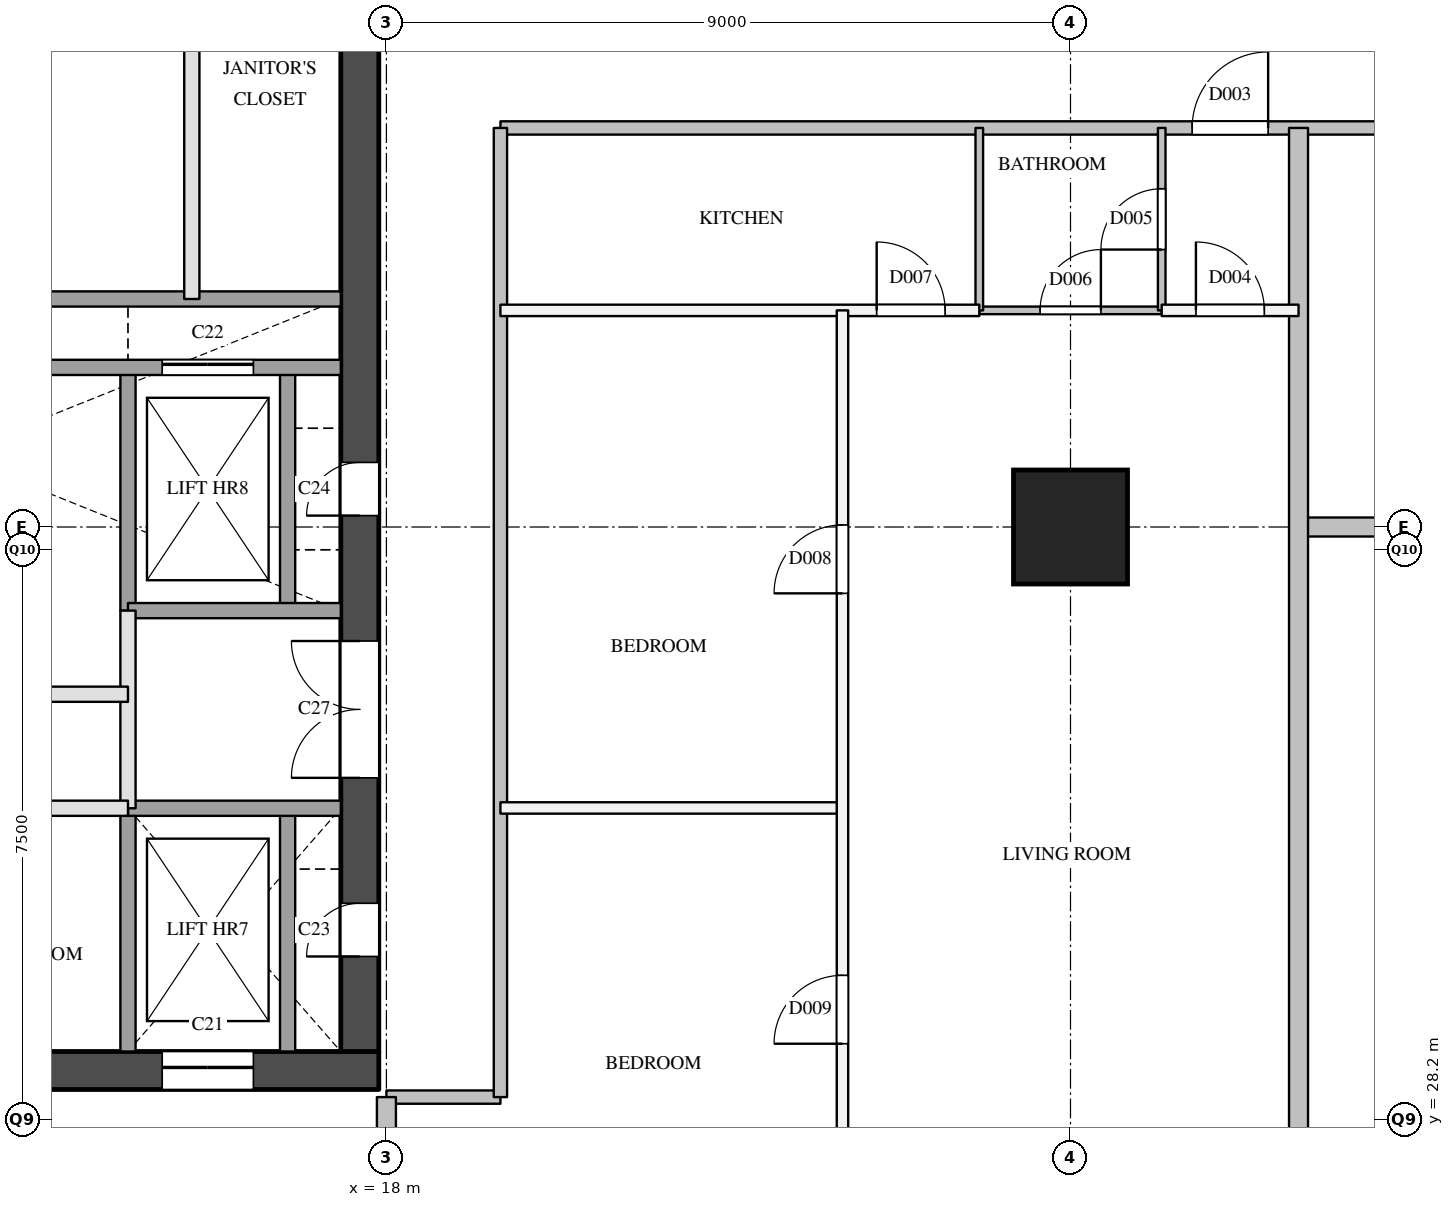
"""IFC4 building model, lengths in metres.
Left out: names, types, materials, properties, quantities, classifications, styles, units other than length and angle.
Written with IfcOpenShell. Run it as: python <this file> out.ifc"""

import sys

from ifc_helpers import new_model, si_unit, direction, frame, frame_2d, origin, origin_2d, place, context, subcontext, project, spatial, rectangle, extrude, element, fill, save


model = new_model("IFC4")
c1 = context("Model", 3, precision=1e-05, world=origin(), true_north=direction((0.0, 1.0)))
c2 = subcontext(c1, "Body", "Model", "MODEL_VIEW")
j1 = project(units=[si_unit("LENGTHUNIT", "METRE"), si_unit("PLANEANGLEUNIT", "RADIAN")], contexts=[c1])
p1 = place(None, origin())
s1 = spatial("IfcSite", under=j1, at=p1, CompositionType="ELEMENT")
p2 = place(p1, origin())
s2 = spatial("IfcBuilding", under=s1, at=p2, CompositionType="ELEMENT")
p3 = place(p2, frame((0.0, 0.0, 158.3)))
s3 = spatial("IfcBuildingStorey", under=s2, at=p3, CompositionType="ELEMENT", Elevation=158.3)
p4 = place(p3, frame((27.0, 36.0, 0.0), z_axis=(0.0, 0.0, 1.0), x_axis=(1.0, 0.0, 0.0)))
e1 = element("IfcColumn", 1, at=p4, inside=s3, PredefinedType="COLUMN", context=c2, shape_type="SweptSolid", body=[
    extrude(rectangle(XDim=1.5, YDim=1.5, at=origin_2d()), origin(), (0.0, 0.0, 1.0), 3.9),
])
p5 = place(p3, frame((5.7, 28.85, 0.0), z_axis=(0.0, 0.0, 1.0), x_axis=(1.0, 0.0, 0.0)))
e2 = element("IfcWall", 2, at=p5, inside=s3, PredefinedType="SHEAR", context=c2, shape_type="SweptSolid", body=[
    extrude(rectangle(XDim=12.2, YDim=0.5, at=frame_2d((6.1, 0.0))), origin(), (0.0, 0.0, 1.0), 3.6),
])
p6 = place(p5, frame((9.35, 0.0, 0.0)))
e3 = element("IfcOpeningElement", 3, at=p6, cuts=e2, PredefinedType="OPENING", context=c2, shape_type="SweptSolid", body=[
    extrude(rectangle(XDim=1.2, YDim=2.1, at=frame_2d((0.6, 1.05))), frame((0.0, 0.26, 0.0), z_axis=(0.0, -1.0, 0.0), x_axis=(1.0, 0.0, 0.0)), (0.0, 0.0, 1.0), 0.52),
])
p7 = place(p3, frame((17.65, 29.1, 0.0), z_axis=(0.0, 0.0, 1.0), x_axis=(0.0, 1.0, 0.0)))
e4 = element("IfcWall", 4, at=p7, inside=s3, PredefinedType="SHEAR", context=c2, shape_type="SweptSolid", body=[
    extrude(rectangle(XDim=20.3, YDim=0.5, at=frame_2d((10.15, 0.0))), origin(), (0.0, 0.0, 1.0), 3.6),
])
p8 = place(p7, frame((1.25, 0.0, 0.0)))
e5 = element("IfcOpeningElement", 5, at=p8, cuts=e4, PredefinedType="OPENING", context=c2, shape_type="SweptSolid", body=[
    extrude(rectangle(XDim=0.7, YDim=2.1, at=frame_2d((0.35, 1.05))), frame((0.0, 0.26, 0.0), z_axis=(0.0, -1.0, 0.0), x_axis=(1.0, 0.0, 0.0)), (0.0, 0.0, 1.0), 0.52),
])
p9 = place(p7, frame((7.05, 0.0, 0.0)))
e6 = element("IfcOpeningElement", 6, at=p9, cuts=e4, PredefinedType="OPENING", context=c2, shape_type="SweptSolid", body=[
    extrude(rectangle(XDim=0.7, YDim=2.1, at=frame_2d((0.35, 1.05))), frame((0.0, 0.26, 0.0), z_axis=(0.0, -1.0, 0.0), x_axis=(1.0, 0.0, 0.0)), (0.0, 0.0, 1.0), 0.52),
])
p10 = place(p7, frame((3.6, 0.0, 0.0)))
e7 = element("IfcOpeningElement", 7, at=p10, cuts=e4, PredefinedType="OPENING", context=c2, shape_type="SweptSolid", body=[
    extrude(rectangle(XDim=1.8, YDim=2.1, at=frame_2d((0.9, 1.05))), frame((0.0, 0.26, 0.0), z_axis=(0.0, -1.0, 0.0), x_axis=(1.0, 0.0, 0.0)), (0.0, 0.0, 1.0), 0.52),
])
p11 = place(p3, frame((14.6, 32.3, 0.0), z_axis=(0.0, 0.0, 1.0), x_axis=(0.0, 1.0, 0.0)))
e8 = element("IfcWall", 8, at=p11, inside=s3, PredefinedType="PARTITIONING", context=c2, shape_type="SweptSolid", body=[
    extrude(rectangle(XDim=2.6, YDim=0.2, at=frame_2d((1.3, 0.0))), origin(), (0.0, 0.0, 1.0), 3.6),
])
p12 = place(p3, frame((14.6, 29.1, 0.0), z_axis=(0.0, 0.0, 1.0), x_axis=(0.0, 1.0, 0.0)))
e9 = element("IfcWall", 9, at=p12, inside=s3, PredefinedType="SOLIDWALL", context=c2, shape_type="SweptSolid", body=[
    extrude(rectangle(XDim=3.2, YDim=0.2, at=frame_2d((1.6, 0.0))), origin(), (0.0, 0.0, 1.0), 3.6),
])
p13 = place(p3, frame((14.6, 34.9, 0.0), z_axis=(0.0, 0.0, 1.0), x_axis=(0.0, 1.0, 0.0)))
e10 = element("IfcWall", 10, at=p13, inside=s3, PredefinedType="SOLIDWALL", context=c2, shape_type="SweptSolid", body=[
    extrude(rectangle(XDim=3.2, YDim=0.2, at=frame_2d((1.6, 0.0))), origin(), (0.0, 0.0, 1.0), 3.6),
])
p14 = place(p3, frame((15.44, 39.0, 0.0), z_axis=(0.0, 0.0, 1.0), x_axis=(0.0, 1.0, 0.0)))
e11 = element("IfcWall", 11, at=p14, inside=s3, PredefinedType="PARTITIONING", context=c2, shape_type="SweptSolid", body=[
    extrude(rectangle(XDim=6.2, YDim=0.2, at=frame_2d((3.1, 0.0))), origin(), (0.0, 0.0, 1.0), 3.6),
])
p15 = place(p3, frame((16.7, 29.1, 0.0), z_axis=(0.0, 0.0, 1.0), x_axis=(0.0, 1.0, 0.0)))
e12 = element("IfcWall", 12, at=p15, inside=s3, PredefinedType="SOLIDWALL", context=c2, shape_type="SweptSolid", body=[
    extrude(rectangle(XDim=3.2, YDim=0.2, at=frame_2d((1.6, 0.0))), origin(), (0.0, 0.0, 1.0), 3.6),
])
p16 = place(p3, frame((16.7, 34.9, 0.0), z_axis=(0.0, 0.0, 1.0), x_axis=(0.0, 1.0, 0.0)))
e13 = element("IfcWall", 13, at=p16, inside=s3, PredefinedType="SOLIDWALL", context=c2, shape_type="SweptSolid", body=[
    extrude(rectangle(XDim=3.2, YDim=0.2, at=frame_2d((1.6, 0.0))), origin(), (0.0, 0.0, 1.0), 3.6),
])
p17 = place(p3, frame((6.2, 32.3, 0.0), z_axis=(0.0, 0.0, 1.0), x_axis=(1.0, 0.0, 0.0)))
e14 = element("IfcWall", 14, at=p17, inside=s3, PredefinedType="PARTITIONING", context=c2, shape_type="SweptSolid", body=[
    extrude(rectangle(XDim=8.4, YDim=0.2, at=frame_2d((4.2, 0.0))), origin(), (0.0, 0.0, 1.0), 3.6),
])
p18 = place(p17, frame((1.23, 0.0, 0.0)))
e15 = element("IfcOpeningElement", 15, at=p18, cuts=e14, PredefinedType="OPENING", context=c2, shape_type="SweptSolid", body=[
    extrude(rectangle(XDim=0.9, YDim=2.1, at=frame_2d((0.45, 1.05))), frame((0.0, 0.11, 0.0), z_axis=(0.0, -1.0, 0.0), x_axis=(1.0, 0.0, 0.0)), (0.0, 0.0, 1.0), 0.22),
])
p19 = place(p17, frame((3.96, 0.0, 0.0)))
e16 = element("IfcOpeningElement", 16, at=p19, cuts=e14, PredefinedType="OPENING", context=c2, shape_type="SweptSolid", body=[
    extrude(rectangle(XDim=0.9, YDim=2.1, at=frame_2d((0.45, 1.05))), frame((0.0, 0.11, 0.0), z_axis=(0.0, -1.0, 0.0), x_axis=(1.0, 0.0, 0.0)), (0.0, 0.0, 1.0), 0.22),
])
p20 = place(p17, frame((6.48, 0.0, 0.0)))
e17 = element("IfcOpeningElement", 17, at=p20, cuts=e14, PredefinedType="OPENING", context=c2, shape_type="SweptSolid", body=[
    extrude(rectangle(XDim=0.9, YDim=2.1, at=frame_2d((0.45, 1.05))), frame((0.0, 0.11, 0.0), z_axis=(0.0, -1.0, 0.0), x_axis=(1.0, 0.0, 0.0)), (0.0, 0.0, 1.0), 0.22),
])
p21 = place(p3, frame((14.6, 32.3, 0.0), z_axis=(0.0, 0.0, 1.0), x_axis=(1.0, 0.0, 0.0)))
e18 = element("IfcWall", 18, at=p21, inside=s3, PredefinedType="SOLIDWALL", context=c2, shape_type="SweptSolid", body=[
    extrude(rectangle(XDim=2.8, YDim=0.2, at=frame_2d((1.4, 0.0))), origin(), (0.0, 0.0, 1.0), 3.6),
])
p22 = place(p3, frame((6.2, 33.8, 0.0), z_axis=(0.0, 0.0, 1.0), x_axis=(1.0, 0.0, 0.0)))
e19 = element("IfcWall", 19, at=p22, inside=s3, PredefinedType="PARTITIONING", context=c2, shape_type="SweptSolid", body=[
    extrude(rectangle(XDim=8.4, YDim=0.2, at=frame_2d((4.2, 0.0))), origin(), (0.0, 0.0, 1.0), 3.6),
])
p23 = place(p22, frame((3.75, 0.0, 0.0)))
e20 = element("IfcOpeningElement", 20, at=p23, cuts=e19, PredefinedType="OPENING", context=c2, shape_type="SweptSolid", body=[
    extrude(rectangle(XDim=0.9, YDim=2.1, at=frame_2d((0.45, 1.05))), frame((0.0, 0.11, 0.0), z_axis=(0.0, -1.0, 0.0), x_axis=(1.0, 0.0, 0.0)), (0.0, 0.0, 1.0), 0.22),
])
p24 = place(p3, frame((14.6, 34.9, 0.0), z_axis=(0.0, 0.0, 1.0), x_axis=(1.0, 0.0, 0.0)))
e21 = element("IfcWall", 21, at=p24, inside=s3, PredefinedType="SOLIDWALL", context=c2, shape_type="SweptSolid", body=[
    extrude(rectangle(XDim=2.8, YDim=0.2, at=frame_2d((1.4, 0.0))), origin(), (0.0, 0.0, 1.0), 3.6),
])
p25 = place(p3, frame((6.2, 38.1, 0.0), z_axis=(0.0, 0.0, 1.0), x_axis=(1.0, 0.0, 0.0)))
e22 = element("IfcWall", 22, at=p25, inside=s3, PredefinedType="SOLIDWALL", context=c2, shape_type="SweptSolid", body=[
    extrude(rectangle(XDim=11.2, YDim=0.2, at=frame_2d((5.6, 0.0))), origin(), (0.0, 0.0, 1.0), 3.6),
])
p26 = place(p25, frame((8.85, 0.0, 0.0)))
e23 = element("IfcOpeningElement", 23, at=p26, cuts=e22, PredefinedType="OPENING", context=c2, shape_type="SweptSolid", body=[
    extrude(rectangle(XDim=1.2, YDim=2.1, at=frame_2d((0.6, 1.05))), frame((0.0, 0.11, 0.0), z_axis=(0.0, -1.0, 0.0), x_axis=(1.0, 0.0, 0.0)), (0.0, 0.0, 1.0), 0.22),
])
p27 = place(p3, frame((12.5, 39.0, 0.0), z_axis=(0.0, 0.0, 1.0), x_axis=(1.0, 0.0, 0.0)))
e24 = element("IfcWall", 24, at=p27, inside=s3, PredefinedType="SOLIDWALL", context=c2, shape_type="SweptSolid", body=[
    extrude(rectangle(XDim=4.9, YDim=0.2, at=frame_2d((2.45, 0.0))), origin(), (0.0, 0.0, 1.0), 3.6),
])
p28 = place(p3, frame((18.0, 28.5, 0.0), z_axis=(0.0, 0.0, 1.0), x_axis=(1.0, 0.0, 0.0)))
e25 = element("IfcWall", 25, at=p28, inside=s3, PredefinedType="PARTITIONING", context=c2, shape_type="SweptSolid", body=[
    extrude(rectangle(XDim=1.5, YDim=0.175, at=frame_2d((0.75, 0.0))), origin(), (0.0, 0.0, 1.0), 3.6),
])
p29 = place(p3, frame((19.5, 41.25, 0.0), z_axis=(0.0, 0.0, 1.0), x_axis=(1.0, 0.0, 0.0)))
e26 = element("IfcWall", 26, at=p29, inside=s3, PredefinedType="PARTITIONING", context=c2, shape_type="SweptSolid", body=[
    extrude(rectangle(XDim=15.0, YDim=0.175, at=frame_2d((7.5, 0.0))), origin(), (0.0, 0.0, 1.0), 2.6),
])
p30 = place(p29, frame((9.1, 0.0, 0.0)))
e27 = element("IfcOpeningElement", 27, at=p30, cuts=e26, PredefinedType="OPENING", context=c2, shape_type="SweptSolid", body=[
    extrude(rectangle(XDim=1.0, YDim=2.1, at=frame_2d((0.5, 1.05))), frame((0.0, 0.097, 0.0), z_axis=(0.0, -1.0, 0.0), x_axis=(1.0, 0.0, 0.0)), (0.0, 0.0, 1.0), 0.195),
])
p31 = place(p3, frame((19.5, 28.5, 0.0), z_axis=(0.0, 0.0, 1.0), x_axis=(0.0, 1.0, 0.0)))
e28 = element("IfcWall", 28, at=p31, inside=s3, PredefinedType="PARTITIONING", context=c2, shape_type="SweptSolid", body=[
    extrude(rectangle(XDim=12.75, YDim=0.175, at=frame_2d((6.375, 0.0))), origin(), (0.0, 0.0, 1.0), 3.6),
])
p32 = place(p3, frame((19.5, 32.304, 0.0), z_axis=(0.0, 0.0, 1.0), x_axis=(1.0, 0.0, 0.0)))
e29 = element("IfcWall", 29, at=p32, inside=s3, PredefinedType="PARTITIONING", context=c2, shape_type="SweptSolid", body=[
    extrude(rectangle(XDim=4.5, YDim=0.15, at=frame_2d((2.25, 0.0))), origin(), (0.0, 0.0, 1.0), 3.6),
])
p33 = place(p3, frame((19.5, 38.85, 0.0), z_axis=(0.0, 0.0, 1.0), x_axis=(1.0, 0.0, 0.0)))
e30 = element("IfcWall", 30, at=p33, inside=s3, PredefinedType="PARTITIONING", context=c2, shape_type="SweptSolid", body=[
    extrude(rectangle(XDim=6.3, YDim=0.15, at=frame_2d((3.15, 0.0))), origin(), (0.0, 0.0, 1.0), 3.6),
])
p34 = place(p33, frame((4.95, 0.0, 0.0)))
e31 = element("IfcOpeningElement", 31, at=p34, cuts=e30, PredefinedType="OPENING", context=c2, shape_type="SweptSolid", body=[
    extrude(rectangle(XDim=0.9, YDim=2.1, at=frame_2d((0.45, 1.05))), frame((0.0, 0.085, 0.0), z_axis=(0.0, -1.0, 0.0), x_axis=(1.0, 0.0, 0.0)), (0.0, 0.0, 1.0), 0.17),
])
p35 = place(p3, frame((28.2, 38.85, 0.0), z_axis=(0.0, 0.0, 1.0), x_axis=(1.0, 0.0, 0.0)))
e32 = element("IfcWall", 32, at=p35, inside=s3, PredefinedType="PARTITIONING", context=c2, shape_type="SweptSolid", body=[
    extrude(rectangle(XDim=1.8, YDim=0.15, at=frame_2d((0.9, 0.0))), origin(), (0.0, 0.0, 1.0), 3.6),
])
p36 = place(p35, frame((0.45, 0.0, 0.0)))
e33 = element("IfcOpeningElement", 33, at=p36, cuts=e32, PredefinedType="OPENING", context=c2, shape_type="SweptSolid", body=[
    extrude(rectangle(XDim=0.9, YDim=2.1, at=frame_2d((0.45, 1.05))), frame((0.0, 0.085, 0.0), z_axis=(0.0, -1.0, 0.0), x_axis=(1.0, 0.0, 0.0)), (0.0, 0.0, 1.0), 0.17),
])
p37 = place(p3, frame((24.0, 27.0, 0.0), z_axis=(0.0, 0.0, 1.0), x_axis=(0.0, 1.0, 0.0)))
e34 = element("IfcWall", 34, at=p37, inside=s3, PredefinedType="PARTITIONING", context=c2, shape_type="SweptSolid", body=[
    extrude(rectangle(XDim=11.85, YDim=0.15, at=frame_2d((5.925, 0.0))), origin(), (0.0, 0.0, 1.0), 2.6),
])
p38 = place(p37, frame((8.127, 0.0, 0.0)))
e35 = element("IfcOpeningElement", 35, at=p38, cuts=e34, PredefinedType="OPENING", context=c2, shape_type="SweptSolid", body=[
    extrude(rectangle(XDim=0.9, YDim=2.1, at=frame_2d((0.45, 1.05))), frame((0.0, 0.085, 0.0), z_axis=(0.0, -1.0, 0.0), x_axis=(1.0, 0.0, 0.0)), (0.0, 0.0, 1.0), 0.17),
])
p39 = place(p37, frame((2.202, 0.0, 0.0)))
e36 = element("IfcOpeningElement", 36, at=p39, cuts=e34, PredefinedType="OPENING", context=c2, shape_type="SweptSolid", body=[
    extrude(rectangle(XDim=0.9, YDim=2.1, at=frame_2d((0.45, 1.05))), frame((0.0, 0.085, 0.0), z_axis=(0.0, -1.0, 0.0), x_axis=(1.0, 0.0, 0.0)), (0.0, 0.0, 1.0), 0.17),
])
p40 = place(p3, frame((30.0, 36.0, 0.0), z_axis=(0.0, 0.0, 1.0), x_axis=(1.0, 0.0, 0.0)))
e37 = element("IfcWall", 37, at=p40, inside=s3, PredefinedType="PARTITIONING", context=c2, shape_type="SweptSolid", body=[
    extrude(rectangle(XDim=4.5, YDim=0.25, at=frame_2d((2.25, 0.0))), origin(), (0.0, 0.0, 1.0), 3.6),
])
p41 = place(p3, frame((18.0, 27.0, 0.0), z_axis=(0.0, 0.0, 1.0), x_axis=(0.0, 1.0, 0.0)))
e38 = element("IfcWall", 38, at=p41, inside=s3, PredefinedType="PARTITIONING", context=c2, shape_type="SweptSolid", body=[
    extrude(rectangle(XDim=1.5, YDim=0.25, at=frame_2d((0.75, 0.0))), origin(), (0.0, 0.0, 1.0), 3.6),
])
p42 = place(p3, frame((30.0, 27.0, 0.0), z_axis=(0.0, 0.0, 1.0), x_axis=(0.0, 1.0, 0.0)))
e39 = element("IfcWall", 39, at=p42, inside=s3, PredefinedType="PARTITIONING", context=c2, shape_type="SweptSolid", body=[
    extrude(rectangle(XDim=14.25, YDim=0.25, at=frame_2d((7.125, 0.0))), origin(), (0.0, 0.0, 1.0), 2.6),
])
p43 = place(p3, frame((25.8, 38.85, 0.0), z_axis=(0.0, 0.0, 1.0), x_axis=(1.0, 0.0, 0.0)))
e40 = element("IfcWall", 40, at=p43, inside=s3, PredefinedType="PARTITIONING", context=c2, shape_type="SweptSolid", body=[
    extrude(rectangle(XDim=2.4, YDim=0.1, at=frame_2d((1.2, 0.0))), origin(), (0.0, 0.0, 1.0), 2.6),
])
p44 = place(p43, frame((0.8, 0.0, 0.0)))
e41 = element("IfcOpeningElement", 41, at=p44, cuts=e40, PredefinedType="OPENING", context=c2, shape_type="SweptSolid", body=[
    extrude(rectangle(XDim=0.8, YDim=2.1, at=frame_2d((0.4, 1.05))), frame((0.0, 0.06, 0.0), z_axis=(0.0, -1.0, 0.0), x_axis=(1.0, 0.0, 0.0)), (0.0, 0.0, 1.0), 0.12),
])
p45 = place(p3, frame((25.8, 38.85, 0.0), z_axis=(0.0, 0.0, 1.0), x_axis=(0.0, 1.0, 0.0)))
e42 = element("IfcWall", 42, at=p45, inside=s3, PredefinedType="PARTITIONING", context=c2, shape_type="SweptSolid", body=[
    extrude(rectangle(XDim=2.4, YDim=0.1, at=frame_2d((1.2, 0.0))), origin(), (0.0, 0.0, 1.0), 3.6),
])
p46 = place(p3, frame((28.2, 38.85, 0.0), z_axis=(0.0, 0.0, 1.0), x_axis=(0.0, 1.0, 0.0)))
e43 = element("IfcWall", 43, at=p46, inside=s3, PredefinedType="PARTITIONING", context=c2, shape_type="SweptSolid", body=[
    extrude(rectangle(XDim=2.4, YDim=0.1, at=frame_2d((1.2, 0.0))), origin(), (0.0, 0.0, 1.0), 3.6),
])
p47 = place(p46, frame((0.8, 0.0, 0.0)))
e44 = element("IfcOpeningElement", 44, at=p47, cuts=e43, PredefinedType="OPENING", context=c2, shape_type="SweptSolid", body=[
    extrude(rectangle(XDim=0.8, YDim=2.1, at=frame_2d((0.4, 1.05))), frame((0.0, 0.06, 0.0), z_axis=(0.0, -1.0, 0.0), x_axis=(1.0, 0.0, 0.0)), (0.0, 0.0, 1.0), 0.12),
])
p48 = place(p6, origin())
e45 = element("IfcDoor", 45, at=p48, inside=s3, OperationType="SLIDING_TO_LEFT", PredefinedType="DOOR", context=c2, shape_type="SweptSolid", body=[
    extrude(rectangle(XDim=1.2, YDim=2.1, at=frame_2d((0.6, 1.05))), frame((0.0, 0.025, 0.0), z_axis=(0.0, -1.0, 0.0), x_axis=(1.0, 0.0, 0.0)), (0.0, 0.0, 1.0), 0.05),
])
fill(e3, e45)
p49 = place(p26, origin())
e46 = element("IfcDoor", 46, at=p49, inside=s3, OperationType="SLIDING_TO_LEFT", PredefinedType="DOOR", context=c2, shape_type="SweptSolid", body=[
    extrude(rectangle(XDim=1.2, YDim=2.1, at=frame_2d((0.6, 1.05))), frame((0.0, 0.025, 0.0), z_axis=(0.0, -1.0, 0.0), x_axis=(1.0, 0.0, 0.0)), (0.0, 0.0, 1.0), 0.05),
])
fill(e23, e46)
p50 = place(p8, origin())
e47 = element("IfcDoor", 47, at=p50, inside=s3, OperationType="SINGLE_SWING_LEFT", PredefinedType="DOOR", context=c2, shape_type="SweptSolid", body=[
    extrude(rectangle(XDim=0.7, YDim=2.1, at=frame_2d((0.35, 1.05))), frame((0.0, 0.025, 0.0), z_axis=(0.0, -1.0, 0.0), x_axis=(1.0, 0.0, 0.0)), (0.0, 0.0, 1.0), 0.05),
])
fill(e5, e47)
p51 = place(p9, origin())
e48 = element("IfcDoor", 48, at=p51, inside=s3, OperationType="SINGLE_SWING_LEFT", PredefinedType="DOOR", context=c2, shape_type="SweptSolid", body=[
    extrude(rectangle(XDim=0.7, YDim=2.1, at=frame_2d((0.35, 1.05))), frame((0.0, 0.025, 0.0), z_axis=(0.0, -1.0, 0.0), x_axis=(1.0, 0.0, 0.0)), (0.0, 0.0, 1.0), 0.05),
])
fill(e6, e48)
p52 = place(p10, origin())
e49 = element("IfcDoor", 49, at=p52, inside=s3, OperationType="DOUBLE_DOOR_SINGLE_SWING", PredefinedType="DOOR", context=c2, shape_type="SweptSolid", body=[
    extrude(rectangle(XDim=1.8, YDim=2.1, at=frame_2d((0.9, 1.05))), frame((0.0, 0.025, 0.0), z_axis=(0.0, -1.0, 0.0), x_axis=(1.0, 0.0, 0.0)), (0.0, 0.0, 1.0), 0.05),
])
fill(e7, e49)
p53 = place(p30, origin())
e50 = element("IfcDoor", 50, at=p53, inside=s3, OperationType="SINGLE_SWING_RIGHT", PredefinedType="DOOR", context=c2, shape_type="SweptSolid", body=[
    extrude(rectangle(XDim=1.0, YDim=2.1, at=frame_2d((0.5, 1.05))), frame((0.0, 0.025, 0.0), z_axis=(0.0, -1.0, 0.0), x_axis=(1.0, 0.0, 0.0)), (0.0, 0.0, 1.0), 0.05),
])
fill(e27, e50)
p54 = place(p36, origin())
e51 = element("IfcDoor", 51, at=p54, inside=s3, OperationType="SINGLE_SWING_LEFT", PredefinedType="DOOR", context=c2, shape_type="SweptSolid", body=[
    extrude(rectangle(XDim=0.9, YDim=2.1, at=frame_2d((0.45, 1.05))), frame((0.0, 0.025, 0.0), z_axis=(0.0, -1.0, 0.0), x_axis=(1.0, 0.0, 0.0)), (0.0, 0.0, 1.0), 0.05),
])
fill(e33, e51)
p55 = place(p47, origin())
e52 = element("IfcDoor", 52, at=p55, inside=s3, OperationType="SINGLE_SWING_LEFT", PredefinedType="DOOR", context=c2, shape_type="SweptSolid", body=[
    extrude(rectangle(XDim=0.8, YDim=2.1, at=frame_2d((0.4, 1.05))), frame((0.0, 0.025, 0.0), z_axis=(0.0, -1.0, 0.0), x_axis=(1.0, 0.0, 0.0)), (0.0, 0.0, 1.0), 0.05),
])
fill(e44, e52)
p56 = place(p44, origin())
e53 = element("IfcDoor", 53, at=p56, inside=s3, OperationType="SINGLE_SWING_RIGHT", PredefinedType="DOOR", context=c2, shape_type="SweptSolid", body=[
    extrude(rectangle(XDim=0.8, YDim=2.1, at=frame_2d((0.4, 1.05))), frame((0.0, 0.025, 0.0), z_axis=(0.0, -1.0, 0.0), x_axis=(1.0, 0.0, 0.0)), (0.0, 0.0, 1.0), 0.05),
])
fill(e41, e53)
p57 = place(p34, origin())
e54 = element("IfcDoor", 54, at=p57, inside=s3, OperationType="SINGLE_SWING_LEFT", PredefinedType="DOOR", context=c2, shape_type="SweptSolid", body=[
    extrude(rectangle(XDim=0.9, YDim=2.1, at=frame_2d((0.45, 1.05))), frame((0.0, 0.025, 0.0), z_axis=(0.0, -1.0, 0.0), x_axis=(1.0, 0.0, 0.0)), (0.0, 0.0, 1.0), 0.05),
])
fill(e31, e54)
p58 = place(p38, origin())
e55 = element("IfcDoor", 55, at=p58, inside=s3, OperationType="SINGLE_SWING_LEFT", PredefinedType="DOOR", context=c2, shape_type="SweptSolid", body=[
    extrude(rectangle(XDim=0.9, YDim=2.1, at=frame_2d((0.45, 1.05))), frame((0.0, 0.025, 0.0), z_axis=(0.0, -1.0, 0.0), x_axis=(1.0, 0.0, 0.0)), (0.0, 0.0, 1.0), 0.05),
])
fill(e35, e55)
p59 = place(p39, origin())
e56 = element("IfcDoor", 56, at=p59, inside=s3, OperationType="SINGLE_SWING_LEFT", PredefinedType="DOOR", context=c2, shape_type="SweptSolid", body=[
    extrude(rectangle(XDim=0.9, YDim=2.1, at=frame_2d((0.45, 1.05))), frame((0.0, 0.025, 0.0), z_axis=(0.0, -1.0, 0.0), x_axis=(1.0, 0.0, 0.0)), (0.0, 0.0, 1.0), 0.05),
])
fill(e36, e56)
save(model, sys.argv[1])
